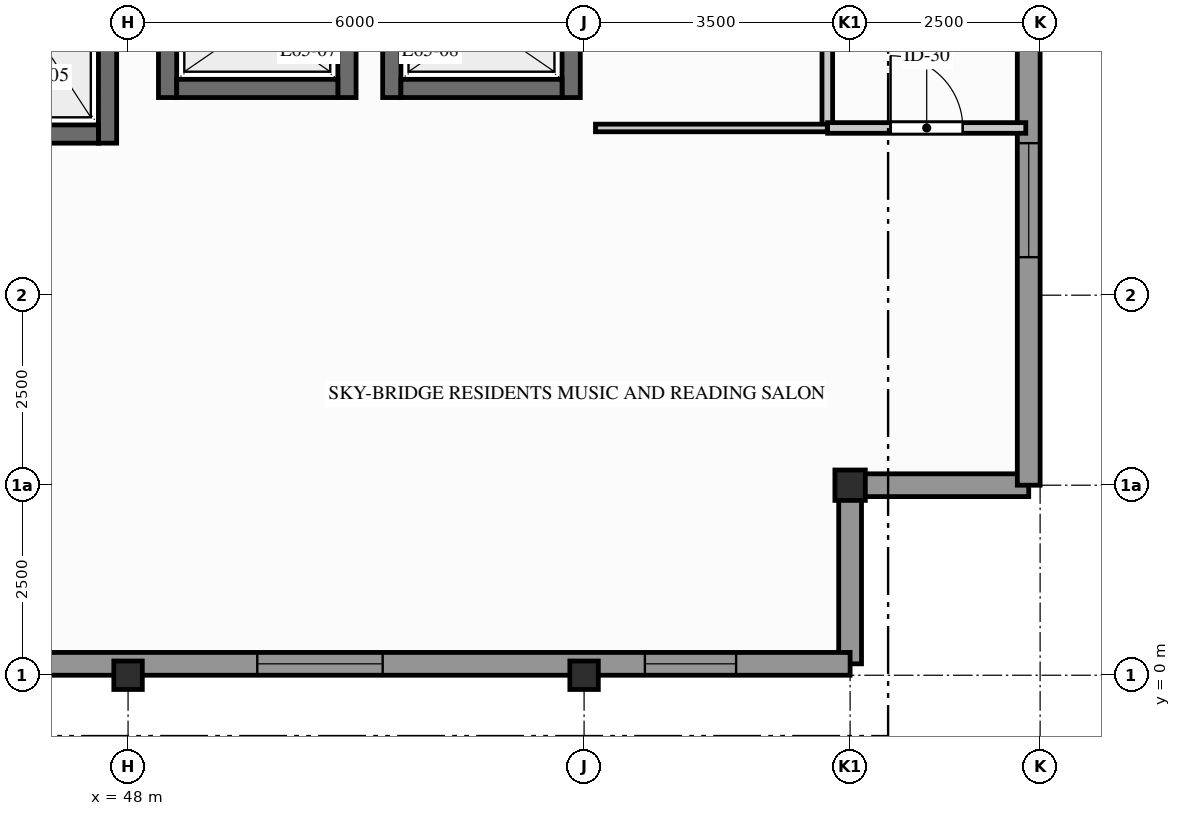
"""IFC4 building model, lengths in metres.
Left out: names, types, materials, properties, quantities, classifications, styles, units other than length and angle.
Written with IfcOpenShell. Run it as: python <this file> out.ifc"""

import sys

from ifc_helpers import new_model, si_unit, direction, frame, frame_2d, origin, origin_2d, place, context, subcontext, project, spatial, rectangle, hollow_rectangle, i_section, extrude, element, fill, save


model = new_model("IFC4")
c1 = context("Model", 3, precision=1e-05, world=origin(), true_north=direction((0.0, 1.0)))
c2 = subcontext(c1, "Body", "Model", "MODEL_VIEW")
j1 = project(units=[si_unit("LENGTHUNIT", "METRE"), si_unit("PLANEANGLEUNIT", "RADIAN")], contexts=[c1])
p1 = place(None, origin())
s1 = spatial("IfcSite", under=j1, at=p1, CompositionType="ELEMENT")
p2 = place(p1, origin())
s2 = spatial("IfcBuilding", under=s1, at=p2, CompositionType="ELEMENT")
p3 = place(p2, frame((0.0, 0.0, 214.4)))
s3 = spatial("IfcBuildingStorey", under=s2, at=p3, CompositionType="ELEMENT", Elevation=214.4)
for number, where, z_axis, x_axis in (
    (1, (48.0, 0.0, 0.0), (0.0, 0.0, 1.0), (1.0, 0.0, 0.0)),
    (2, (54.0, 0.0, 0.0), (0.0, 0.0, 1.0), (1.0, 0.0, 0.0)),
):
    element("IfcColumn", number, at=place(p3, frame(where, z_axis=z_axis, x_axis=x_axis)), inside=s3, PredefinedType="COLUMN", context=c2, shape_type="SweptSolid", body=[
        extrude(i_section(OverallWidth=0.375, OverallDepth=0.375, WebThickness=0.017, FlangeThickness=0.027, FilletRadius=0.015, at=origin_2d()), origin(), (0.0, 0.0, 1.0), 3.6),
    ])
p4 = place(p3, frame((57.5, 2.5, 0.0), z_axis=(0.0, 0.0, 1.0), x_axis=(1.0, 0.0, 0.0)))
e3 = element("IfcColumn", 3, at=p4, inside=s3, PredefinedType="COLUMN", context=c2, shape_type="SweptSolid", body=[
    extrude(hollow_rectangle(XDim=0.4, YDim=0.4, WallThickness=0.02, InnerFilletRadius=0.012, OuterFilletRadius=0.024, at=origin_2d()), origin(), (0.0, 0.0, 1.0), 3.6),
])
for number, where, z_axis, x_axis in (
    (4, (57.5, 0.15, 0.0), (0.0, 0.0, 1.0), (0.0, 1.0, 0.0)),
    (5, (57.5, 2.5, 0.0), (0.0, 0.0, 1.0), (1.0, 0.0, 0.0)),
):
    element("IfcWall", number, at=place(p3, frame(where, z_axis=z_axis, x_axis=x_axis)), inside=s3, PredefinedType="STANDARD", context=c2, shape_type="SweptSolid", body=[
        extrude(rectangle(XDim=2.35, YDim=0.3, at=frame_2d((1.175, 0.0))), origin(), (0.0, 0.0, 1.0), 3.33),
    ])
p5 = place(p3, frame((2.5, 0.15, 0.0), z_axis=(0.0, 0.0, 1.0), x_axis=(1.0, 0.0, 0.0)))
e6 = element("IfcWall", 6, at=p5, inside=s3, PredefinedType="STANDARD", context=c2, shape_type="SweptSolid", body=[
    extrude(rectangle(XDim=55.0, YDim=0.3, at=frame_2d((27.5, 0.0))), origin(), (0.0, 0.0, 1.0), 2.454),
])
p6 = place(p5, frame((4.85, 0.0, 0.0)))
e7 = element("IfcOpeningElement", 7, at=p6, cuts=e6, PredefinedType="OPENING", context=c2, shape_type="SweptSolid", body=[
    extrude(rectangle(XDim=1.1, YDim=2.2, at=frame_2d((0.55, 1.1))), frame((0.0, 0.16, 0.0), z_axis=(0.0, -1.0, 0.0), x_axis=(1.0, 0.0, 0.0)), (0.0, 0.0, 1.0), 0.32),
])
p7 = place(p5, frame((1.0, 0.0, 0.434)))
e8 = element("IfcOpeningElement", 8, at=p7, cuts=e6, PredefinedType="OPENING", context=c2, shape_type="SweptSolid", body=[
    extrude(rectangle(XDim=1.5, YDim=1.8, at=frame_2d((0.75, 0.9))), frame((0.0, 0.16, 0.0), z_axis=(0.0, -1.0, 0.0), x_axis=(1.0, 0.0, 0.0)), (0.0, 0.0, 1.0), 0.32),
])
p8 = place(p5, frame((47.2, 0.0, 0.334)))
e9 = element("IfcOpeningElement", 9, at=p8, cuts=e6, PredefinedType="OPENING", context=c2, shape_type="SweptSolid", body=[
    extrude(rectangle(XDim=1.65, YDim=1.9, at=frame_2d((0.825, 0.95))), frame((0.0, 0.16, 0.0), z_axis=(0.0, -1.0, 0.0), x_axis=(1.0, 0.0, 0.0)), (0.0, 0.0, 1.0), 0.32),
])
p9 = place(p5, frame((52.3, 0.0, 0.634)))
e10 = element("IfcOpeningElement", 10, at=p9, cuts=e6, PredefinedType="OPENING", context=c2, shape_type="SweptSolid", body=[
    extrude(rectangle(XDim=1.2, YDim=1.6, at=frame_2d((0.6, 0.8))), frame((0.0, 0.16, 0.0), z_axis=(0.0, -1.0, 0.0), x_axis=(1.0, 0.0, 0.0)), (0.0, 0.0, 1.0), 0.32),
])
p10 = place(p3, frame((59.85, 2.5, 0.0), z_axis=(0.0, 0.0, 1.0), x_axis=(0.0, 1.0, 0.0)))
e11 = element("IfcWall", 11, at=p10, inside=s3, PredefinedType="STANDARD", context=c2, shape_type="SweptSolid", body=[
    extrude(rectangle(XDim=8.05, YDim=0.3, at=frame_2d((4.025, 0.0))), origin(), (0.0, 0.0, 1.0), 3.33),
])
p11 = place(p10, frame((3.0, 0.0, 0.95)))
e12 = element("IfcOpeningElement", 12, at=p11, cuts=e11, PredefinedType="OPENING", context=c2, shape_type="SweptSolid", body=[
    extrude(rectangle(XDim=1.5, YDim=1.8, at=frame_2d((0.75, 0.9))), frame((0.0, 0.16, 0.0), z_axis=(0.0, -1.0, 0.0), x_axis=(1.0, 0.0, 0.0)), (0.0, 0.0, 1.0), 0.32),
])
p12 = place(p3, frame((47.73, 7.0, 0.0), z_axis=(0.0, 0.0, 1.0), x_axis=(0.0, 1.0, 0.0)))
e13 = element("IfcWall", 13, at=p12, inside=s3, PredefinedType="SHEAR", context=c2, shape_type="SweptSolid", body=[
    extrude(rectangle(XDim=2.7, YDim=0.24, at=frame_2d((1.35, 0.0))), origin(), (0.0, 0.0, 1.0), 3.33),
])
p13 = place(p3, frame((46.09, 7.12, 0.0), z_axis=(0.0, 0.0, 1.0), x_axis=(1.0, 0.0, 0.0)))
e14 = element("IfcWall", 14, at=p13, inside=s3, PredefinedType="SHEAR", context=c2, shape_type="SweptSolid", body=[
    extrude(rectangle(XDim=1.52, YDim=0.24, at=frame_2d((0.76, 0.0))), origin(), (0.0, 0.0, 1.0), 3.33),
])
for number, where, z_axis, x_axis in (
    (15, (48.52, 7.6, 0.0), (0.0, 0.0, 1.0), (0.0, 1.0, 0.0)),
    (16, (50.88, 7.6, 0.0), (0.0, 0.0, 1.0), (0.0, 1.0, 0.0)),
):
    element("IfcWall", number, at=place(p3, frame(where, z_axis=z_axis, x_axis=x_axis)), inside=s3, PredefinedType="SHEAR", context=c2, shape_type="SweptSolid", body=[
        extrude(rectangle(XDim=2.0, YDim=0.24, at=frame_2d((1.0, 0.0))), origin(), (0.0, 0.0, 1.0), 3.33),
    ])
p14 = place(p3, frame((48.64, 7.72, 0.0), z_axis=(0.0, 0.0, 1.0), x_axis=(1.0, 0.0, 0.0)))
e17 = element("IfcWall", 17, at=p14, inside=s3, PredefinedType="SHEAR", context=c2, shape_type="SweptSolid", body=[
    extrude(rectangle(XDim=2.12, YDim=0.24, at=frame_2d((1.06, 0.0))), origin(), (0.0, 0.0, 1.0), 3.33),
])
for number, where, z_axis, x_axis in (
    (18, (51.47, 7.6, 0.0), (0.0, 0.0, 1.0), (0.0, 1.0, 0.0)),
    (19, (53.83, 7.6, 0.0), (0.0, 0.0, 1.0), (0.0, 1.0, 0.0)),
):
    element("IfcWall", number, at=place(p3, frame(where, z_axis=z_axis, x_axis=x_axis)), inside=s3, PredefinedType="SHEAR", context=c2, shape_type="SweptSolid", body=[
        extrude(rectangle(XDim=2.0, YDim=0.24, at=frame_2d((1.0, 0.0))), origin(), (0.0, 0.0, 1.0), 3.33),
    ])
p15 = place(p3, frame((51.59, 7.72, 0.0), z_axis=(0.0, 0.0, 1.0), x_axis=(1.0, 0.0, 0.0)))
e20 = element("IfcWall", 20, at=p15, inside=s3, PredefinedType="SHEAR", context=c2, shape_type="SweptSolid", body=[
    extrude(rectangle(XDim=2.12, YDim=0.24, at=frame_2d((1.06, 0.0))), origin(), (0.0, 0.0, 1.0), 3.33),
])
p16 = place(p3, frame((57.2, 7.2, 0.0), z_axis=(0.0, 0.0, 1.0), x_axis=(0.0, 1.0, 0.0)))
e21 = element("IfcWall", 21, at=p16, inside=s3, PredefinedType="PARTITIONING", context=c2, shape_type="SweptSolid", body=[
    extrude(rectangle(XDim=5.4, YDim=0.14, at=frame_2d((2.7, 0.0))), origin(), (0.0, 0.0, 1.0), 2.685),
])
p17 = place(p3, frame((54.15, 7.2, 0.0), z_axis=(0.0, 0.0, 1.0), x_axis=(1.0, 0.0, 0.0)))
e22 = element("IfcWall", 22, at=p17, inside=s3, PredefinedType="PARTITIONING", context=c2, shape_type="SweptSolid", body=[
    extrude(rectangle(XDim=3.05, YDim=0.1, at=frame_2d((1.525, 0.0))), origin(), (0.0, 0.0, 1.0), 2.685),
])
p18 = place(p3, frame((57.204, 7.2, 0.0), z_axis=(0.0, 0.0, 1.0), x_axis=(1.0, 0.0, 0.0)))
e23 = element("IfcWall", 23, at=p18, inside=s3, PredefinedType="PARTITIONING", context=c2, shape_type="SweptSolid", body=[
    extrude(rectangle(XDim=2.607, YDim=0.14, at=frame_2d((1.304, 0.0))), origin(), (0.0, 0.0, 1.0), 3.33),
])
p19 = place(p18, frame((0.829, 0.0, 0.0)))
e24 = element("IfcOpeningElement", 24, at=p19, cuts=e23, PredefinedType="OPENING", context=c2, shape_type="SweptSolid", body=[
    extrude(rectangle(XDim=0.95, YDim=2.05, at=frame_2d((0.475, 1.025))), frame((0.0, 0.08, 0.0), z_axis=(0.0, -1.0, 0.0), x_axis=(1.0, 0.0, 0.0)), (0.0, 0.0, 1.0), 0.16),
])
p20 = place(p8, origin())
e25 = element("IfcWindow", 25, at=p20, inside=s3, PartitioningType="SINGLE_PANEL", PredefinedType="WINDOW", context=c2, shape_type="SweptSolid", body=[
    extrude(rectangle(XDim=1.65, YDim=1.9, at=frame_2d((0.825, 0.95))), frame((0.0, 0.03, 0.0), z_axis=(0.0, -1.0, 0.0), x_axis=(1.0, 0.0, 0.0)), (0.0, 0.0, 1.0), 0.06),
])
fill(e9, e25)
p21 = place(p9, origin())
e26 = element("IfcWindow", 26, at=p21, inside=s3, PartitioningType="SINGLE_PANEL", PredefinedType="WINDOW", context=c2, shape_type="SweptSolid", body=[
    extrude(rectangle(XDim=1.2, YDim=1.6, at=frame_2d((0.6, 0.8))), frame((0.0, 0.03, 0.0), z_axis=(0.0, -1.0, 0.0), x_axis=(1.0, 0.0, 0.0)), (0.0, 0.0, 1.0), 0.06),
])
fill(e10, e26)
p22 = place(p11, origin())
e27 = element("IfcWindow", 27, at=p22, inside=s3, PartitioningType="SINGLE_PANEL", PredefinedType="WINDOW", context=c2, shape_type="SweptSolid", body=[
    extrude(rectangle(XDim=1.5, YDim=1.8, at=frame_2d((0.75, 0.9))), frame((0.0, 0.03, 0.0), z_axis=(0.0, -1.0, 0.0), x_axis=(1.0, 0.0, 0.0)), (0.0, 0.0, 1.0), 0.06),
])
fill(e12, e27)
p23 = place(p19, origin())
e28 = element("IfcDoor", 28, at=p23, inside=s3, OperationType="SINGLE_SWING_LEFT", PredefinedType="DOOR", context=c2, shape_type="SweptSolid", body=[
    extrude(rectangle(XDim=0.95, YDim=2.05, at=frame_2d((0.475, 1.025))), frame((0.0, 0.025, 0.0), z_axis=(0.0, -1.0, 0.0), x_axis=(1.0, 0.0, 0.0)), (0.0, 0.0, 1.0), 0.05),
])
fill(e24, e28)
save(model, sys.argv[1])
